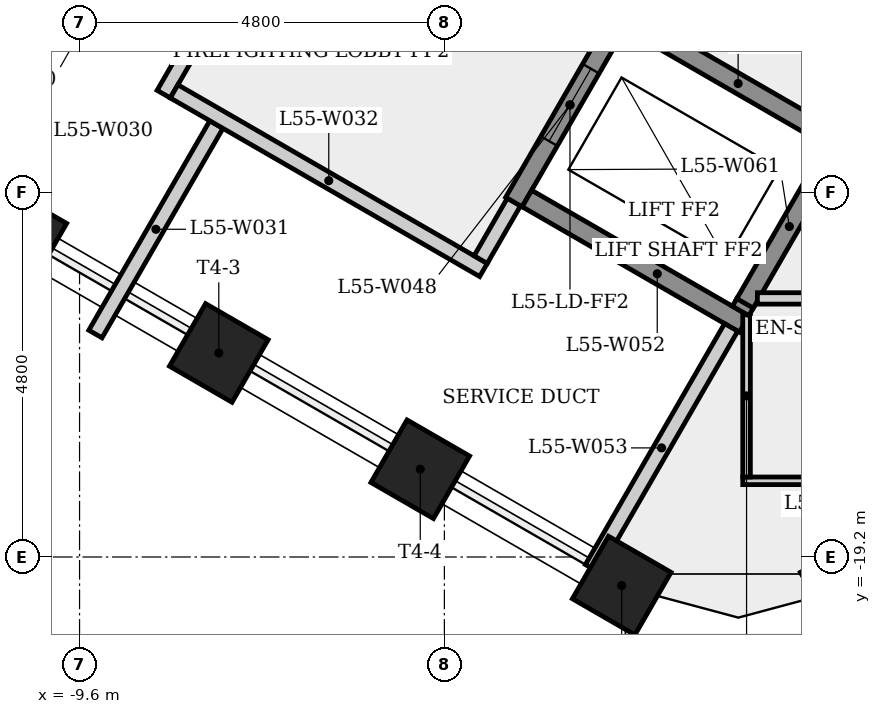
"""IFC4 building model, lengths in metres.
Left out: names, types, materials, properties, quantities, classifications, styles, units other than length and angle.
Written with IfcOpenShell. Run it as: python <this file> out.ifc"""

import sys

from ifc_helpers import new_model, si_unit, direction, frame, frame_2d, origin, origin_2d, place, context, subcontext, project, spatial, rectangle, extrude, element, fill, save


model = new_model("IFC4")
c1 = context("Model", 3, precision=1e-05, world=origin(), true_north=direction((0.0, 1.0)))
c2 = subcontext(c1, "Body", "Model", "MODEL_VIEW")
j1 = project(units=[si_unit("LENGTHUNIT", "METRE"), si_unit("PLANEANGLEUNIT", "RADIAN")], contexts=[c1])
p1 = place(None, origin())
s1 = spatial("IfcSite", under=j1, at=p1, CompositionType="ELEMENT")
p2 = place(p1, origin())
s2 = spatial("IfcBuilding", under=s1, at=p2, CompositionType="ELEMENT")
p3 = place(p2, frame((0.0, 0.0, 206.1)))
s3 = spatial("IfcBuildingStorey", under=s2, at=p3, CompositionType="ELEMENT", Elevation=206.1)
for number, where, z_axis, x_axis in (
    (1, (-10.418, -14.985, 0.0), (0.0, 0.0, 1.0), (-0.5, -0.866, 0.0)),
    (2, (-7.768, -16.515, 0.0), (0.0, 0.0, 1.0), (-0.5, -0.866, 0.0)),
    (3, (-5.117, -18.045, 0.0), (0.0, 0.0, 1.0), (-0.5, -0.866, 0.0)),
    (4, (-2.467, -19.576, 0.0), (0.0, 0.0, 1.0), (-0.5, -0.866, 0.0)),
    (5, (0.533, -19.576, 0.0), (0.0, 0.0, 1.0), (0.5, -0.866, 0.0)),
):
    element("IfcColumn", number, at=place(p3, frame(where, z_axis=z_axis, x_axis=x_axis)), inside=s3, PredefinedType="COLUMN", context=c2, shape_type="SweptSolid", body=[
        extrude(rectangle(XDim=0.95, YDim=0.95, at=origin_2d()), origin(), (0.0, 0.0, 1.0), 4.0),
    ])
p4 = place(p3, frame((-8.493, -13.11, 0.0), z_axis=(0.0, 0.0, 1.0), x_axis=(0.500067724834, 0.865986299303, 0.0)))
e6 = element("IfcWall", 6, at=p4, inside=s3, PredefinedType="PLUMBINGWALL", context=c2, shape_type="SweptSolid", body=[
    extrude(rectangle(XDim=0.775, YDim=0.2, at=frame_2d((0.388, 0.0))), origin(), (0.0, 0.0, 1.0), 3.6),
])
p5 = place(p3, frame((-7.8, -13.51, 0.0), z_axis=(0.0, 0.0, 1.0), x_axis=(-0.500016846771, -0.866015677078, 0.0)))
e7 = element("IfcWall", 7, at=p5, inside=s3, PredefinedType="PLUMBINGWALL", context=c2, shape_type="SweptSolid", body=[
    extrude(rectangle(XDim=3.183, YDim=0.2, at=frame_2d((1.591, 0.0))), origin(), (0.0, 0.0, 1.0), 3.6),
])
p6 = place(p3, frame((-8.356, -13.073, 0.0), z_axis=(0.0, 0.0, 1.0), x_axis=(0.866038532462, -0.499977259774, 0.0)))
e8 = element("IfcWall", 8, at=p6, inside=s3, PredefinedType="PLUMBINGWALL", context=c2, shape_type="SweptSolid", body=[
    extrude(rectangle(XDim=4.7, YDim=0.2, at=frame_2d((2.35, 0.0))), origin(), (0.0, 0.0, 1.0), 3.6),
])
p7 = place(p3, frame((-3.885, -14.529, 0.0), z_axis=(0.0, 0.0, 1.0), x_axis=(-0.499859285417, -0.866106630146, 0.0)))
e9 = element("IfcWall", 9, at=p7, inside=s3, PredefinedType="PLUMBINGWALL", context=c2, shape_type="SweptSolid", body=[
    extrude(rectangle(XDim=0.875, YDim=0.2, at=frame_2d((0.438, 0.0))), origin(), (0.0, 0.0, 1.0), 3.6),
])
p8 = place(p3, frame((-2.41, -11.974, 0.0), z_axis=(0.0, 0.0, 1.0), x_axis=(-0.500001826776, -0.866024349092, 0.0)))
e10 = element("IfcWall", 10, at=p8, inside=s3, PredefinedType="SHEAR", context=c2, shape_type="SweptSolid", body=[
    extrude(rectangle(XDim=2.95, YDim=0.25, at=frame_2d((1.475, 0.0))), origin(), (0.0, 0.0, 1.0), 3.6),
])
p9 = place(p8, frame((0.925, 0.0, 0.0)))
e11 = element("IfcOpeningElement", 11, at=p9, cuts=e10, PredefinedType="OPENING", context=c2, shape_type="SweptSolid", body=[
    extrude(rectangle(XDim=1.1, YDim=2.1, at=frame_2d((0.55, 1.05))), frame((0.0, 0.135, 0.0), z_axis=(0.0, -1.0, 0.0), x_axis=(1.0, 0.0, 0.0)), (0.0, 0.0, 1.0), 0.27),
])
p10 = place(p3, frame((-2.364, -12.145, 0.0), z_axis=(0.0, 0.0, 1.0), x_axis=(0.866040211805, -0.499974350878, 0.0)))
e12 = element("IfcWall", 12, at=p10, inside=s3, PredefinedType="SHEAR", context=c2, shape_type="SweptSolid", body=[
    extrude(rectangle(XDim=3.3, YDim=0.25, at=frame_2d((1.65, 0.0))), origin(), (0.0, 0.0, 1.0), 3.6),
])
p11 = place(p3, frame((-0.856, -16.133, 0.0), z_axis=(0.0, 0.0, 1.0), x_axis=(-0.866021716278, 0.500006386895, 0.0)))
e13 = element("IfcWall", 13, at=p11, inside=s3, PredefinedType="SHEAR", context=c2, shape_type="SweptSolid", body=[
    extrude(rectangle(XDim=3.3, YDim=0.25, at=frame_2d((1.65, 0.0))), origin(), (0.0, 0.0, 1.0), 3.6),
])
p12 = place(p3, frame((-1.027, -16.179, 0.0), z_axis=(0.0, 0.0, 1.0), x_axis=(-0.499989866495, -0.866031254287, 0.0)))
e14 = element("IfcWall", 14, at=p12, inside=s3, PredefinedType="PLUMBINGWALL", context=c2, shape_type="SweptSolid", body=[
    extrude(rectangle(XDim=3.662, YDim=0.2, at=frame_2d((1.831, 0.0))), origin(), (0.0, 0.0, 1.0), 3.6),
])
p13 = place(p3, frame((-0.874, -18.198, 0.0), z_axis=(0.0, 0.0, 1.0), x_axis=(1.0, 0.0, 0.0)))
e15 = element("IfcWall", 15, at=p13, inside=s3, PredefinedType="PARTITIONING", context=c2, shape_type="SweptSolid", body=[
    extrude(rectangle(XDim=2.4, YDim=0.1, at=frame_2d((1.2, 0.0))), origin(), (0.0, 0.0, 1.0), 3.6),
])
p14 = place(p3, frame((-0.824, -16.013, 0.0), z_axis=(0.0, 0.0, 1.0), x_axis=(0.0, -1.0, 0.0)))
e16 = element("IfcWall", 16, at=p14, inside=s3, PredefinedType="PARTITIONING", context=c2, shape_type="SweptSolid", body=[
    extrude(rectangle(XDim=2.135, YDim=0.1, at=frame_2d((1.067, 0.0))), origin(), (0.0, 0.0, 1.0), 3.6),
])
p15 = place(p3, frame((-0.839, -15.854, 0.0), z_axis=(0.0, 0.0, 1.0), x_axis=(-0.500730218626, -0.865603401191, 0.0)))
e17 = element("IfcWall", 17, at=p15, inside=s3, PredefinedType="SHEAR", context=c2, shape_type="SweptSolid", body=[
    extrude(rectangle(XDim=0.126, YDim=0.25, at=frame_2d((0.063, 0.0))), origin(), (0.0, 0.0, 1.0), 4.0),
])
p16 = place(p3, frame((0.323, -13.841, 0.0), z_axis=(0.0, 0.0, 1.0), x_axis=(-0.500030198396, -0.86600796803, 0.0)))
e18 = element("IfcWall", 18, at=p16, inside=s3, PredefinedType="SHEAR", context=c2, shape_type="SweptSolid", body=[
    extrude(rectangle(XDim=2.335, YDim=0.25, at=frame_2d((1.167, 0.0))), origin(), (0.0, 0.0, 1.0), 4.0),
])
p17 = place(p3, frame((-0.682, -15.798, 0.0), z_axis=(0.0, 0.0, 1.0), x_axis=(1.0, 0.0, 0.0)))
e19 = element("IfcWall", 19, at=p17, inside=s3, PredefinedType="PARTITIONING", context=c2, shape_type="SweptSolid", body=[
    extrude(rectangle(XDim=4.16, YDim=0.15, at=frame_2d((2.08, 0.0))), origin(), (0.0, 0.0, 1.0), 3.6),
])
p18 = place(p17, frame((2.724, 0.0, 0.0)))
e20 = element("IfcOpeningElement", 20, at=p18, cuts=e19, PredefinedType="OPENING", context=c2, shape_type="SweptSolid", body=[
    extrude(rectangle(XDim=0.9, YDim=2.1, at=frame_2d((0.45, 1.05))), frame((0.0, 0.085, 0.0), z_axis=(0.0, -1.0, 0.0), x_axis=(1.0, 0.0, 0.0)), (0.0, 0.0, 1.0), 0.17),
])
p19 = place(p9, origin())
e21 = element("IfcDoor", 21, at=p19, inside=s3, OperationType="SLIDING_TO_LEFT", PredefinedType="DOOR", context=c2, shape_type="SweptSolid", body=[
    extrude(rectangle(XDim=1.1, YDim=2.1, at=frame_2d((0.55, 1.05))), frame((0.0, 0.025, 0.0), z_axis=(0.0, -1.0, 0.0), x_axis=(1.0, 0.0, 0.0)), (0.0, 0.0, 1.0), 0.05),
])
fill(e11, e21)
save(model, sys.argv[1])
